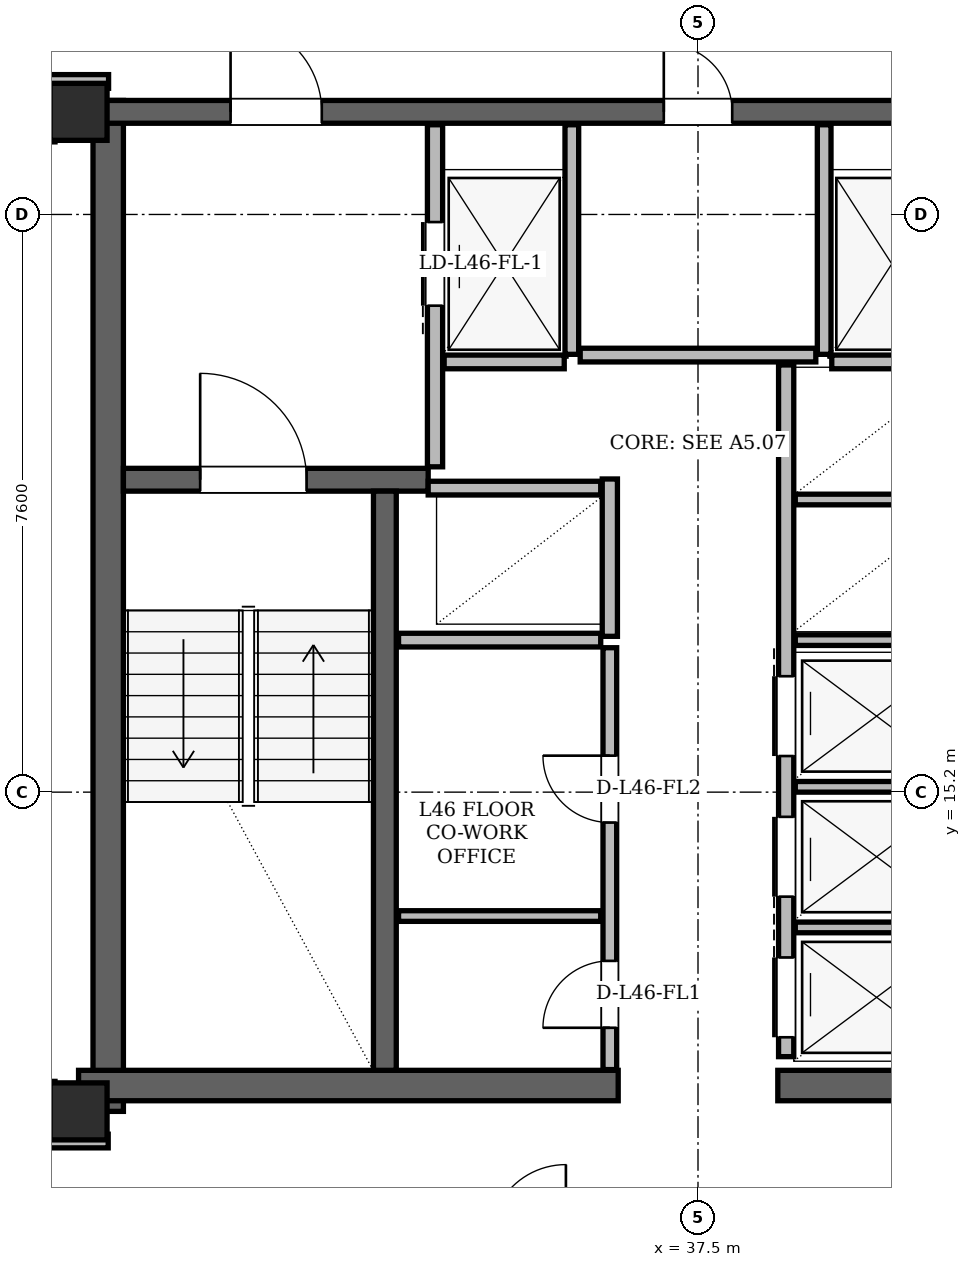
"""IFC4 building model, lengths in metres.
Left out: names, types, materials, properties, quantities, classifications, styles, units other than length and angle.
Written with IfcOpenShell. Run it as: python <this file> out.ifc"""

import sys

from ifc_helpers import new_model, si_unit, direction, frame, frame_2d, origin, origin_2d, place, context, subcontext, project, spatial, rectangle, hollow_rectangle, extrude, element, fill, save


model = new_model("IFC4")
c1 = context("Model", 3, precision=1e-05, world=origin(), true_north=direction((0.0, 1.0)))
c2 = subcontext(c1, "Body", "Model", "MODEL_VIEW")
j1 = project(units=[si_unit("LENGTHUNIT", "METRE"), si_unit("PLANEANGLEUNIT", "RADIAN")], contexts=[c1])
p1 = place(None, origin())
s1 = spatial("IfcSite", under=j1, at=p1, CompositionType="ELEMENT")
p2 = place(p1, origin())
s2 = spatial("IfcBuilding", under=s1, at=p2, CompositionType="ELEMENT")
p3 = place(p2, frame((0.0, 0.0, 174.6)))
s3 = spatial("IfcBuildingStorey", under=s2, at=p3, CompositionType="ELEMENT", Elevation=174.6)
for number, where, z_axis, x_axis in (
    (1, (29.35, 11.0, 0.0), (0.0, 0.0, 1.0), (1.0, 0.0, 0.0)),
    (2, (29.35, 24.15, 0.0), (0.0, 0.0, 1.0), (1.0, 0.0, 0.0)),
):
    element("IfcColumn", number, at=place(p3, frame(where, z_axis=z_axis, x_axis=x_axis)), inside=s3, PredefinedType="COLUMN", context=c2, shape_type="SweptSolid", body=[
        extrude(hollow_rectangle(XDim=0.75, YDim=0.75, WallThickness=0.06, at=origin_2d()), origin(), (0.0, 0.0, 1.0), 3.6),
    ])
p4 = place(p3, frame((29.74, 11.0, 0.0), z_axis=(0.0, 0.0, 1.0), x_axis=(0.0, 1.0, 0.0)))
e3 = element("IfcWall", 3, at=p4, inside=s3, PredefinedType="SHEAR", context=c2, shape_type="SweptSolid", body=[
    extrude(rectangle(XDim=13.3, YDim=0.4, at=frame_2d((6.65, 0.0))), origin(), (0.0, 0.0, 1.0), 3.38),
])
for number, where, z_axis, x_axis in (
    (4, (29.35, 11.34, 0.0), (0.0, 0.0, 1.0), (1.0, 0.0, 0.0)),
    (5, (38.55, 11.34, 0.0), (0.0, 0.0, 1.0), (1.0, 0.0, 0.0)),
):
    element("IfcWall", number, at=place(p3, frame(where, z_axis=z_axis, x_axis=x_axis)), inside=s3, PredefinedType="SHEAR", context=c2, shape_type="SweptSolid", body=[
        extrude(rectangle(XDim=7.1, YDim=0.4, at=frame_2d((3.55, 0.0))), origin(), (0.0, 0.0, 1.0), 3.38),
    ])
p5 = place(p3, frame((29.65, 24.15, 0.0), z_axis=(0.0, 0.0, 1.0), x_axis=(1.0, 0.0, 0.0)))
e6 = element("IfcWall", 6, at=p5, inside=s3, PredefinedType="SHEAR", context=c2, shape_type="SweptSolid", body=[
    extrude(rectangle(XDim=15.7, YDim=0.3, at=frame_2d((7.85, 0.0))), origin(), (0.0, 0.0, 1.0), 3.38),
])
p6 = place(p5, frame((1.7, 0.0, 0.0)))
e7 = element("IfcOpeningElement", 7, at=p6, cuts=e6, PredefinedType="OPENING", context=c2, shape_type="SweptSolid", body=[
    extrude(rectangle(XDim=1.2, YDim=2.2, at=frame_2d((0.6, 1.1))), frame((0.0, 0.15, 0.0), z_axis=(0.0, -1.0, 0.0), x_axis=(1.0, 0.0, 0.0)), (0.0, 0.0, 1.0), 0.3),
])
p7 = place(p5, frame((12.8, 0.0, 0.0)))
e8 = element("IfcOpeningElement", 8, at=p7, cuts=e6, PredefinedType="OPENING", context=c2, shape_type="SweptSolid", body=[
    extrude(rectangle(XDim=1.2, YDim=2.2, at=frame_2d((0.6, 1.1))), frame((0.0, 0.15, 0.0), z_axis=(0.0, -1.0, 0.0), x_axis=(1.0, 0.0, 0.0)), (0.0, 0.0, 1.0), 0.3),
])
p8 = place(p5, frame((7.4, 0.0, 0.0)))
e9 = element("IfcOpeningElement", 9, at=p8, cuts=e6, PredefinedType="OPENING", context=c2, shape_type="SweptSolid", body=[
    extrude(rectangle(XDim=0.9, YDim=2.05, at=frame_2d((0.45, 1.025))), frame((0.0, 0.15, 0.0), z_axis=(0.0, -1.0, 0.0), x_axis=(1.0, 0.0, 0.0)), (0.0, 0.0, 1.0), 0.3),
])
p9 = place(p3, frame((29.94, 19.31, 0.0), z_axis=(0.0, 0.0, 1.0), x_axis=(1.0, 0.0, 0.0)))
e10 = element("IfcWall", 10, at=p9, inside=s3, PredefinedType="SHEAR", context=c2, shape_type="SweptSolid", body=[
    extrude(rectangle(XDim=4.01, YDim=0.3, at=frame_2d((2.005, 0.0))), origin(), (0.0, 0.0, 1.0), 3.38),
])
p10 = place(p9, frame((1.01, 0.0, 0.0)))
e11 = element("IfcOpeningElement", 11, at=p10, cuts=e10, PredefinedType="OPENING", context=c2, shape_type="SweptSolid", body=[
    extrude(rectangle(XDim=1.4, YDim=2.2, at=frame_2d((0.7, 1.1))), frame((0.0, 0.15, 0.0), z_axis=(0.0, -1.0, 0.0), x_axis=(1.0, 0.0, 0.0)), (0.0, 0.0, 1.0), 0.3),
])
p11 = place(p3, frame((33.38, 11.54, 0.0), z_axis=(0.0, 0.0, 1.0), x_axis=(0.0, 1.0, 0.0)))
e12 = element("IfcWall", 12, at=p11, inside=s3, PredefinedType="SHEAR", context=c2, shape_type="SweptSolid", body=[
    extrude(rectangle(XDim=7.62, YDim=0.3, at=frame_2d((3.81, 0.0))), origin(), (0.0, 0.0, 1.0), 3.38),
])
p12 = place(p3, frame((33.305, 43.266, 0.0), z_axis=(0.0, 0.0, 1.0), x_axis=(-0.499997724503, -0.866026717539, 0.0)))
e13 = element("IfcWall", 13, at=p12, inside=s3, PredefinedType="SOLIDWALL", context=c2, shape_type="SweptSolid", body=[
    extrude(rectangle(XDim=35.93, YDim=0.29, at=frame_2d((17.965, 0.0))), origin(), (0.0, 0.0, 1.0), 2.6),
])
p13 = place(p12, frame((3.429, 0.0, 0.0)))
e14 = element("IfcOpeningElement", 14, at=p13, cuts=e13, PredefinedType="OPENING", context=c2, shape_type="SweptSolid", body=[
    extrude(rectangle(XDim=1.5, YDim=2.2, at=frame_2d((0.75, 1.1))), frame((0.0, 0.145, 0.0), z_axis=(0.0, -1.0, 0.0), x_axis=(1.0, 0.0, 0.0)), (0.0, 0.0, 1.0), 0.29),
])
p14 = place(p12, frame((26.395, 0.0, 0.0)))
e15 = element("IfcOpeningElement", 15, at=p14, cuts=e13, PredefinedType="OPENING", context=c2, shape_type="SweptSolid", body=[
    extrude(rectangle(XDim=1.5, YDim=2.2, at=frame_2d((0.75, 1.1))), frame((0.0, 0.145, 0.0), z_axis=(0.0, -1.0, 0.0), x_axis=(1.0, 0.0, 0.0)), (0.0, 0.0, 1.0), 0.29),
])
p15 = place(p12, frame((33.871, 0.0, 0.85)))
e16 = element("IfcOpeningElement", 16, at=p15, cuts=e13, PredefinedType="OPENING", context=c2, shape_type="SweptSolid", body=[
    extrude(rectangle(XDim=1.2, YDim=1.48, at=frame_2d((0.6, 0.74))), frame((0.0, 0.145, 0.0), z_axis=(0.0, -1.0, 0.0), x_axis=(1.0, 0.0, 0.0)), (0.0, 0.0, 1.0), 0.29),
])
p16 = place(p12, frame((18.111, 0.0, 0.85)))
e17 = element("IfcOpeningElement", 17, at=p16, cuts=e13, PredefinedType="OPENING", context=c2, shape_type="SweptSolid", body=[
    extrude(rectangle(XDim=2.6, YDim=1.64, at=frame_2d((1.3, 0.82))), frame((0.0, 0.145, 0.0), z_axis=(0.0, -1.0, 0.0), x_axis=(1.0, 0.0, 0.0)), (0.0, 0.0, 1.0), 0.29),
])
p17 = place(p12, frame((28.176, 0.0, 0.85)))
e18 = element("IfcOpeningElement", 18, at=p17, cuts=e13, PredefinedType="OPENING", context=c2, shape_type="SweptSolid", body=[
    extrude(rectangle(XDim=1.2, YDim=1.48, at=frame_2d((0.6, 0.74))), frame((0.0, 0.145, 0.0), z_axis=(0.0, -1.0, 0.0), x_axis=(1.0, 0.0, 0.0)), (0.0, 0.0, 1.0), 0.29),
])
p18 = place(p12, frame((12.519, 0.0, 0.85)))
e19 = element("IfcOpeningElement", 19, at=p18, cuts=e13, PredefinedType="OPENING", context=c2, shape_type="SweptSolid", body=[
    extrude(rectangle(XDim=1.2, YDim=1.48, at=frame_2d((0.6, 0.74))), frame((0.0, 0.145, 0.0), z_axis=(0.0, -1.0, 0.0), x_axis=(1.0, 0.0, 0.0)), (0.0, 0.0, 1.0), 0.29),
])
p19 = place(p12, frame((14.808, 0.0, 0.85)))
e20 = element("IfcOpeningElement", 20, at=p19, cuts=e13, PredefinedType="OPENING", context=c2, shape_type="SweptSolid", body=[
    extrude(rectangle(XDim=1.8, YDim=1.64, at=frame_2d((0.9, 0.82))), frame((0.0, 0.145, 0.0), z_axis=(0.0, -1.0, 0.0), x_axis=(1.0, 0.0, 0.0)), (0.0, 0.0, 1.0), 0.29),
])
p20 = place(p12, frame((8.735, 0.0, 0.85)))
e21 = element("IfcOpeningElement", 21, at=p20, cuts=e13, PredefinedType="OPENING", context=c2, shape_type="SweptSolid", body=[
    extrude(rectangle(XDim=1.2, YDim=1.48, at=frame_2d((0.6, 0.74))), frame((0.0, 0.145, 0.0), z_axis=(0.0, -1.0, 0.0), x_axis=(1.0, 0.0, 0.0)), (0.0, 0.0, 1.0), 0.29),
])
p21 = place(p12, frame((6.749, 0.0, 0.85)))
e22 = element("IfcOpeningElement", 22, at=p21, cuts=e13, PredefinedType="OPENING", context=c2, shape_type="SweptSolid", body=[
    extrude(rectangle(XDim=1.2, YDim=1.48, at=frame_2d((0.6, 0.74))), frame((0.0, 0.145, 0.0), z_axis=(0.0, -1.0, 0.0), x_axis=(1.0, 0.0, 0.0)), (0.0, 0.0, 1.0), 0.29),
])
p22 = place(p12, frame((1.837, 0.0, 0.85)))
e23 = element("IfcOpeningElement", 23, at=p22, cuts=e13, PredefinedType="OPENING", context=c2, shape_type="SweptSolid", body=[
    extrude(rectangle(XDim=1.2, YDim=1.48, at=frame_2d((0.6, 0.74))), frame((0.0, 0.145, 0.0), z_axis=(0.0, -1.0, 0.0), x_axis=(1.0, 0.0, 0.0)), (0.0, 0.0, 1.0), 0.29),
])
p23 = place(p3, frame((34.04, 19.48, 0.0), z_axis=(0.0, 0.0, 1.0), x_axis=(0.0, 1.0, 0.0)))
e24 = element("IfcWall", 24, at=p23, inside=s3, PredefinedType="PARTITIONING", context=c2, shape_type="SweptSolid", body=[
    extrude(rectangle(XDim=4.5, YDim=0.2, at=frame_2d((2.25, 0.0))), origin(), (0.0, 0.0, 1.0), 3.38),
])
p24 = place(p23, frame((2.12, 0.0, 0.0)))
e25 = element("IfcOpeningElement", 25, at=p24, cuts=e24, PredefinedType="OPENING", context=c2, shape_type="SweptSolid", body=[
    extrude(rectangle(XDim=1.1, YDim=2.2, at=frame_2d((0.55, 1.1))), frame((0.0, 0.1, 0.0), z_axis=(0.0, -1.0, 0.0), x_axis=(1.0, 0.0, 0.0)), (0.0, 0.0, 1.0), 0.2),
])
p25 = place(p3, frame((35.84, 20.96, 0.0), z_axis=(0.0, 0.0, 1.0), x_axis=(0.0, 1.0, 0.0)))
e26 = element("IfcWall", 26, at=p25, inside=s3, PredefinedType="PARTITIONING", context=c2, shape_type="SweptSolid", body=[
    extrude(rectangle(XDim=3.02, YDim=0.18, at=frame_2d((1.51, 0.0))), origin(), (0.0, 0.0, 1.0), 3.38),
])
p26 = place(p3, frame((34.16, 20.86, 0.0), z_axis=(0.0, 0.0, 1.0), x_axis=(1.0, 0.0, 0.0)))
e27 = element("IfcWall", 27, at=p26, inside=s3, PredefinedType="PARTITIONING", context=c2, shape_type="SweptSolid", body=[
    extrude(rectangle(XDim=1.58, YDim=0.18, at=frame_2d((0.79, 0.0))), origin(), (0.0, 0.0, 1.0), 3.38),
])
p27 = place(p3, frame((39.16, 20.96, 0.0), z_axis=(0.0, 0.0, 1.0), x_axis=(0.0, 1.0, 0.0)))
e28 = element("IfcWall", 28, at=p27, inside=s3, PredefinedType="PARTITIONING", context=c2, shape_type="SweptSolid", body=[
    extrude(rectangle(XDim=3.02, YDim=0.18, at=frame_2d((1.51, 0.0))), origin(), (0.0, 0.0, 1.0), 3.38),
])
p28 = place(p3, frame((39.26, 20.86, 0.0), z_axis=(0.0, 0.0, 1.0), x_axis=(1.0, 0.0, 0.0)))
e29 = element("IfcWall", 29, at=p28, inside=s3, PredefinedType="PARTITIONING", context=c2, shape_type="SweptSolid", body=[
    extrude(rectangle(XDim=1.58, YDim=0.18, at=frame_2d((0.79, 0.0))), origin(), (0.0, 0.0, 1.0), 3.38),
])
p29 = place(p3, frame((36.34, 17.25, 0.0), z_axis=(0.0, 0.0, 1.0), x_axis=(0.0, 1.0, 0.0)))
e30 = element("IfcWall", 30, at=p29, inside=s3, PredefinedType="PARTITIONING", context=c2, shape_type="SweptSolid", body=[
    extrude(rectangle(XDim=2.07, YDim=0.2, at=frame_2d((1.035, 0.0))), origin(), (0.0, 0.0, 1.0), 3.38),
])
p30 = place(p3, frame((33.95, 19.2, 0.0), z_axis=(0.0, 0.0, 1.0), x_axis=(1.0, 0.0, 0.0)))
e31 = element("IfcWall", 31, at=p30, inside=s3, PredefinedType="PARTITIONING", context=c2, shape_type="SweptSolid", body=[
    extrude(rectangle(XDim=2.27, YDim=0.18, at=frame_2d((1.135, 0.0))), origin(), (0.0, 0.0, 1.0), 3.38),
])
p31 = place(p3, frame((33.56, 17.2, 0.0), z_axis=(0.0, 0.0, 1.0), x_axis=(1.0, 0.0, 0.0)))
e32 = element("IfcWall", 32, at=p31, inside=s3, PredefinedType="PARTITIONING", context=c2, shape_type="SweptSolid", body=[
    extrude(rectangle(XDim=2.66, YDim=0.18, at=frame_2d((1.33, 0.0))), origin(), (0.0, 0.0, 1.0), 3.38),
])
p32 = place(p3, frame((36.34, 11.55, 0.0), z_axis=(0.0, 0.0, 1.0), x_axis=(0.0, 1.0, 0.0)))
e33 = element("IfcWall", 33, at=p32, inside=s3, PredefinedType="PARTITIONING", context=c2, shape_type="SweptSolid", body=[
    extrude(rectangle(XDim=5.55, YDim=0.18, at=frame_2d((2.775, 0.0))), origin(), (0.0, 0.0, 1.0), 3.38),
])
p33 = place(p32, frame((0.55, 0.0, 0.0)))
e34 = element("IfcOpeningElement", 34, at=p33, cuts=e33, PredefinedType="OPENING", context=c2, shape_type="SweptSolid", body=[
    extrude(rectangle(XDim=0.88, YDim=2.08, at=frame_2d((0.44, 1.04))), frame((0.0, 0.09, 0.0), z_axis=(0.0, -1.0, 0.0), x_axis=(1.0, 0.0, 0.0)), (0.0, 0.0, 1.0), 0.18),
])
p34 = place(p32, frame((3.25, 0.0, 0.0)))
e35 = element("IfcOpeningElement", 35, at=p34, cuts=e33, PredefinedType="OPENING", context=c2, shape_type="SweptSolid", body=[
    extrude(rectangle(XDim=0.88, YDim=2.08, at=frame_2d((0.44, 1.04))), frame((0.0, 0.09, 0.0), z_axis=(0.0, -1.0, 0.0), x_axis=(1.0, 0.0, 0.0)), (0.0, 0.0, 1.0), 0.18),
])
p35 = place(p3, frame((33.56, 13.57, 0.0), z_axis=(0.0, 0.0, 1.0), x_axis=(1.0, 0.0, 0.0)))
e36 = element("IfcWall", 36, at=p35, inside=s3, PredefinedType="PARTITIONING", context=c2, shape_type="SweptSolid", body=[
    extrude(rectangle(XDim=2.66, YDim=0.14, at=frame_2d((1.33, 0.0))), origin(), (0.0, 0.0, 1.0), 3.38),
])
p36 = place(p3, frame((38.66, 11.72, 0.0), z_axis=(0.0, 0.0, 1.0), x_axis=(0.0, 1.0, 0.0)))
e37 = element("IfcWall", 37, at=p36, inside=s3, PredefinedType="PARTITIONING", context=c2, shape_type="SweptSolid", body=[
    extrude(rectangle(XDim=9.1, YDim=0.2, at=frame_2d((4.55, 0.0))), origin(), (0.0, 0.0, 1.0), 3.38),
])
p37 = place(p36, frame((0.255, 0.0, 0.0)))
e38 = element("IfcOpeningElement", 38, at=p37, cuts=e37, PredefinedType="OPENING", context=c2, shape_type="SweptSolid", body=[
    extrude(rectangle(XDim=1.05, YDim=2.15, at=frame_2d((0.525, 1.075))), frame((0.0, 0.1, 0.0), z_axis=(0.0, -1.0, 0.0), x_axis=(1.0, 0.0, 0.0)), (0.0, 0.0, 1.0), 0.2),
])
p38 = place(p36, frame((2.105, 0.0, 0.0)))
e39 = element("IfcOpeningElement", 39, at=p38, cuts=e37, PredefinedType="OPENING", context=c2, shape_type="SweptSolid", body=[
    extrude(rectangle(XDim=1.05, YDim=2.15, at=frame_2d((0.525, 1.075))), frame((0.0, 0.1, 0.0), z_axis=(0.0, -1.0, 0.0), x_axis=(1.0, 0.0, 0.0)), (0.0, 0.0, 1.0), 0.2),
])
p39 = place(p36, frame((3.955, 0.0, 0.0)))
e40 = element("IfcOpeningElement", 40, at=p39, cuts=e37, PredefinedType="OPENING", context=c2, shape_type="SweptSolid", body=[
    extrude(rectangle(XDim=1.05, YDim=2.15, at=frame_2d((0.525, 1.075))), frame((0.0, 0.1, 0.0), z_axis=(0.0, -1.0, 0.0), x_axis=(1.0, 0.0, 0.0)), (0.0, 0.0, 1.0), 0.2),
])
for number, where, z_axis, x_axis in (
    (41, (38.78, 13.42, 0.0), (0.0, 0.0, 1.0), (1.0, 0.0, 0.0)),
    (42, (38.78, 15.27, 0.0), (0.0, 0.0, 1.0), (1.0, 0.0, 0.0)),
    (43, (38.78, 17.2, 0.0), (0.0, 0.0, 1.0), (1.0, 0.0, 0.0)),
    (44, (38.78, 19.05, 0.0), (0.0, 0.0, 1.0), (1.0, 0.0, 0.0)),
):
    element("IfcWall", number, at=place(p3, frame(where, z_axis=z_axis, x_axis=x_axis)), inside=s3, PredefinedType="PARTITIONING", context=c2, shape_type="SweptSolid", body=[
        extrude(rectangle(XDim=2.66, YDim=0.14, at=frame_2d((1.33, 0.0))), origin(), (0.0, 0.0, 1.0), 3.38),
    ])
p40 = place(p3, frame((35.95, 20.95, 0.0), z_axis=(0.0, 0.0, 1.0), x_axis=(1.0, 0.0, 0.0)))
e45 = element("IfcWall", 45, at=p40, inside=s3, PredefinedType="PARTITIONING", context=c2, shape_type="SweptSolid", body=[
    extrude(rectangle(XDim=3.1, YDim=0.18, at=frame_2d((1.55, 0.0))), origin(), (0.0, 0.0, 1.0), 3.38),
])
p41 = place(p3, frame((28.96, 10.61, 0.0), z_axis=(0.0, 0.0, 1.0), x_axis=(1.0, 0.0, 0.0)))
e46 = element("IfcWall", 46, at=p41, inside=s3, PredefinedType="PARTITIONING", context=c2, shape_type="SweptSolid", body=[
    extrude(rectangle(XDim=0.78, YDim=0.18, at=frame_2d((0.39, 0.0))), origin(), (0.0, 0.0, 1.0), 3.38),
])
p42 = place(p3, frame((28.955, 24.55, 0.0), z_axis=(0.0, 0.0, 1.0), x_axis=(1.0, 0.0, 0.0)))
e47 = element("IfcWall", 47, at=p42, inside=s3, PredefinedType="PARTITIONING", context=c2, shape_type="SweptSolid", body=[
    extrude(rectangle(XDim=0.79, YDim=0.18, at=frame_2d((0.395, 0.0))), origin(), (0.0, 0.0, 1.0), 2.842),
])
p43 = place(p3, frame((28.95, 10.95, 0.0), z_axis=(0.0, 0.0, 1.0), x_axis=(0.0, 1.0, 0.0)))
e48 = element("IfcWall", 48, at=p43, inside=s3, PredefinedType="PARTITIONING", context=c2, shape_type="SweptSolid", body=[
    extrude(rectangle(XDim=0.445, YDim=0.18, at=frame_2d((0.223, 0.0))), origin(), (0.0, 0.0, 1.0), 2.842),
])
p44 = place(p3, frame((28.95, 23.755, 0.0), z_axis=(0.0, 0.0, 1.0), x_axis=(0.0, 1.0, 0.0)))
e49 = element("IfcWall", 49, at=p44, inside=s3, PredefinedType="PARTITIONING", context=c2, shape_type="SweptSolid", body=[
    extrude(rectangle(XDim=0.565, YDim=0.18, at=frame_2d((0.283, 0.0))), origin(), (0.0, 0.0, 1.0), 3.38),
])
p45 = place(p33, origin())
e50 = element("IfcDoor", 50, at=p45, inside=s3, OperationType="SINGLE_SWING_LEFT", PredefinedType="DOOR", context=c2, shape_type="SweptSolid", body=[
    extrude(rectangle(XDim=0.88, YDim=2.08, at=frame_2d((0.44, 1.04))), frame((0.0, 0.025, 0.0), z_axis=(0.0, -1.0, 0.0), x_axis=(1.0, 0.0, 0.0)), (0.0, 0.0, 1.0), 0.05),
])
fill(e34, e50)
p46 = place(p34, origin())
e51 = element("IfcDoor", 51, at=p46, inside=s3, OperationType="SINGLE_SWING_RIGHT", PredefinedType="DOOR", context=c2, shape_type="SweptSolid", body=[
    extrude(rectangle(XDim=0.88, YDim=2.08, at=frame_2d((0.44, 1.04))), frame((0.0, 0.025, 0.0), z_axis=(0.0, -1.0, 0.0), x_axis=(1.0, 0.0, 0.0)), (0.0, 0.0, 1.0), 0.05),
])
fill(e35, e51)
p47 = place(p24, origin())
e52 = element("IfcDoor", 52, at=p47, inside=s3, OperationType="SLIDING_TO_LEFT", PredefinedType="DOOR", context=c2, shape_type="SweptSolid", body=[
    extrude(rectangle(XDim=1.1, YDim=2.2, at=frame_2d((0.55, 1.1))), frame((0.0, 0.025, 0.0), z_axis=(0.0, -1.0, 0.0), x_axis=(1.0, 0.0, 0.0)), (0.0, 0.0, 1.0), 0.05),
])
fill(e25, e52)
p48 = place(p37, origin())
e53 = element("IfcDoor", 53, at=p48, inside=s3, OperationType="SLIDING_TO_RIGHT", PredefinedType="DOOR", context=c2, shape_type="SweptSolid", body=[
    extrude(rectangle(XDim=1.05, YDim=2.15, at=frame_2d((0.525, 1.075))), frame((0.0, 0.025, 0.0), z_axis=(0.0, -1.0, 0.0), x_axis=(1.0, 0.0, 0.0)), (0.0, 0.0, 1.0), 0.05),
])
fill(e38, e53)
p49 = place(p38, origin())
e54 = element("IfcDoor", 54, at=p49, inside=s3, OperationType="SLIDING_TO_LEFT", PredefinedType="DOOR", context=c2, shape_type="SweptSolid", body=[
    extrude(rectangle(XDim=1.05, YDim=2.15, at=frame_2d((0.525, 1.075))), frame((0.0, 0.025, 0.0), z_axis=(0.0, -1.0, 0.0), x_axis=(1.0, 0.0, 0.0)), (0.0, 0.0, 1.0), 0.05),
])
fill(e39, e54)
p50 = place(p39, origin())
e55 = element("IfcDoor", 55, at=p50, inside=s3, OperationType="SLIDING_TO_RIGHT", PredefinedType="DOOR", context=c2, shape_type="SweptSolid", body=[
    extrude(rectangle(XDim=1.05, YDim=2.15, at=frame_2d((0.525, 1.075))), frame((0.0, 0.025, 0.0), z_axis=(0.0, -1.0, 0.0), x_axis=(1.0, 0.0, 0.0)), (0.0, 0.0, 1.0), 0.05),
])
fill(e40, e55)
p51 = place(p10, origin())
e56 = element("IfcDoor", 56, at=p51, inside=s3, OperationType="SINGLE_SWING_LEFT", PredefinedType="DOOR", context=c2, shape_type="SweptSolid", body=[
    extrude(rectangle(XDim=1.4, YDim=2.2, at=frame_2d((0.7, 1.1))), frame((0.0, 0.025, 0.0), z_axis=(0.0, -1.0, 0.0), x_axis=(1.0, 0.0, 0.0)), (0.0, 0.0, 1.0), 0.05),
])
fill(e11, e56)
p52 = place(p6, origin())
e57 = element("IfcDoor", 57, at=p52, inside=s3, OperationType="SINGLE_SWING_LEFT", PredefinedType="DOOR", context=c2, shape_type="SweptSolid", body=[
    extrude(rectangle(XDim=1.2, YDim=2.2, at=frame_2d((0.6, 1.1))), frame((0.0, 0.025, 0.0), z_axis=(0.0, -1.0, 0.0), x_axis=(1.0, 0.0, 0.0)), (0.0, 0.0, 1.0), 0.05),
])
fill(e7, e57)
p53 = place(p8, origin())
e58 = element("IfcDoor", 58, at=p53, inside=s3, OperationType="SINGLE_SWING_LEFT", PredefinedType="DOOR", context=c2, shape_type="SweptSolid", body=[
    extrude(rectangle(XDim=0.9, YDim=2.05, at=frame_2d((0.45, 1.025))), frame((0.0, 0.025, 0.0), z_axis=(0.0, -1.0, 0.0), x_axis=(1.0, 0.0, 0.0)), (0.0, 0.0, 1.0), 0.05),
])
fill(e9, e58)
save(model, sys.argv[1])
